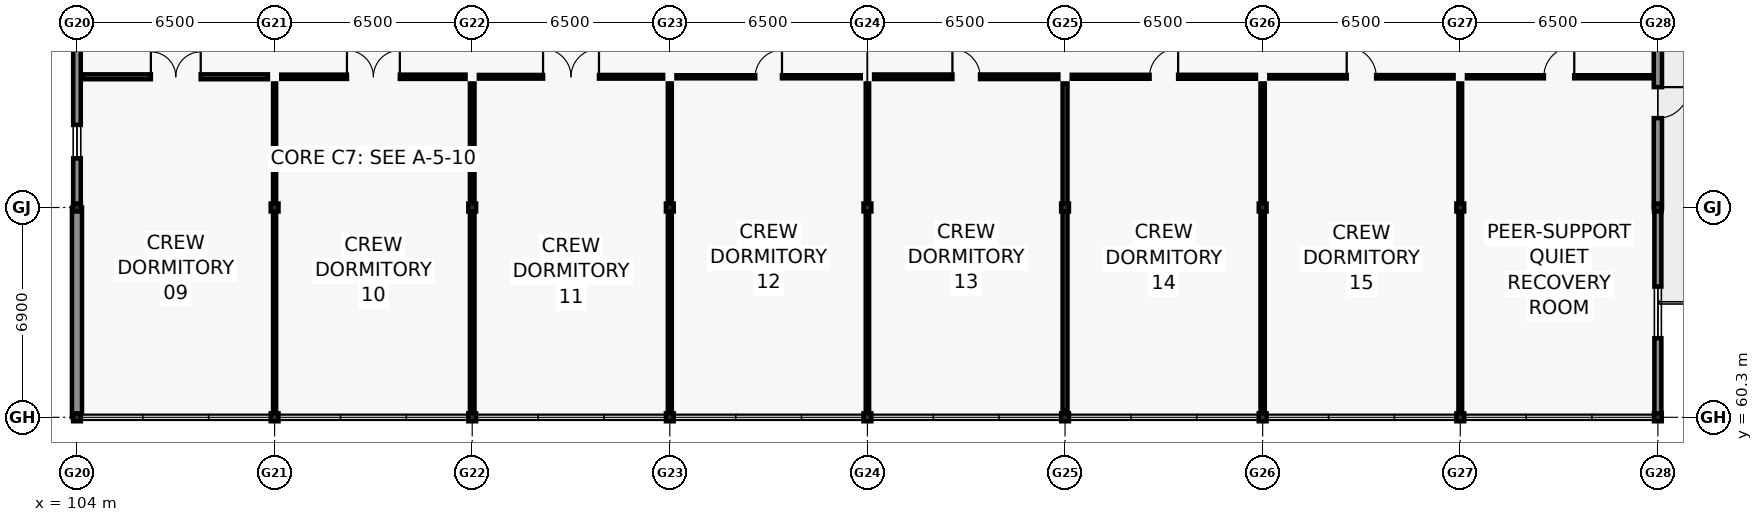
"""IFC4 building model, lengths in metres.
Left out: names, types, materials, properties, quantities, classifications, styles, units other than length and angle.
Written with IfcOpenShell. Run it as: python <this file> out.ifc"""

import sys

from ifc_helpers import new_model, si_unit, direction, frame, frame_2d, origin, origin_2d, place, context, subcontext, project, spatial, rectangle, i_section, extrude, element, fill, save


model = new_model("IFC4")
c1 = context("Model", 3, precision=1e-05, world=origin(), true_north=direction((0.0, 1.0)))
c2 = subcontext(c1, "Body", "Model", "MODEL_VIEW")
j1 = project(units=[si_unit("LENGTHUNIT", "METRE"), si_unit("PLANEANGLEUNIT", "RADIAN")], contexts=[c1])
p1 = place(None, origin())
s1 = spatial("IfcSite", under=j1, at=p1, CompositionType="ELEMENT")
p2 = place(p1, origin())
s2 = spatial("IfcBuilding", under=s1, at=p2, CompositionType="ELEMENT")
p3 = place(p2, frame((0.0, 0.0, 13.5)))
s3 = spatial("IfcBuildingStorey", under=s2, at=p3, CompositionType="ELEMENT", Elevation=13.5)
for number, where, z_axis, x_axis in (
    (1, (104.0, 60.3, 0.0), (0.0, 0.0, 1.0), (1.0, 0.0, 0.0)),
    (2, (104.0, 67.2, 0.0), (0.0, 0.0, 1.0), (1.0, 0.0, 0.0)),
    (3, (110.5, 60.3, 0.0), (0.0, 0.0, 1.0), (1.0, 0.0, 0.0)),
    (4, (110.5, 67.2, 0.0), (0.0, 0.0, 1.0), (1.0, 0.0, 0.0)),
    (5, (117.0, 60.3, 0.0), (0.0, 0.0, 1.0), (1.0, 0.0, 0.0)),
    (6, (117.0, 67.2, 0.0), (0.0, 0.0, 1.0), (1.0, 0.0, 0.0)),
    (7, (123.5, 60.3, 0.0), (0.0, 0.0, 1.0), (1.0, 0.0, 0.0)),
    (8, (123.5, 67.2, 0.0), (0.0, 0.0, 1.0), (1.0, 0.0, 0.0)),
    (9, (130.0, 60.3, 0.0), (0.0, 0.0, 1.0), (1.0, 0.0, 0.0)),
    (10, (130.0, 67.2, 0.0), (0.0, 0.0, 1.0), (1.0, 0.0, 0.0)),
    (11, (136.5, 60.3, 0.0), (0.0, 0.0, 1.0), (1.0, 0.0, 0.0)),
    (12, (136.5, 67.2, 0.0), (0.0, 0.0, 1.0), (1.0, 0.0, 0.0)),
    (13, (143.0, 60.3, 0.0), (0.0, 0.0, 1.0), (1.0, 0.0, 0.0)),
    (14, (143.0, 67.2, 0.0), (0.0, 0.0, 1.0), (1.0, 0.0, 0.0)),
    (15, (149.5, 60.3, 0.0), (0.0, 0.0, 1.0), (1.0, 0.0, 0.0)),
    (16, (149.5, 67.2, 0.0), (0.0, 0.0, 1.0), (1.0, 0.0, 0.0)),
    (17, (156.0, 60.3, 0.0), (0.0, 0.0, 1.0), (1.0, 0.0, 0.0)),
    (18, (156.0, 67.2, 0.0), (0.0, 0.0, 1.0), (1.0, 0.0, 0.0)),
):
    element("IfcColumn", number, at=place(p3, frame(where, z_axis=z_axis, x_axis=x_axis)), inside=s3, PredefinedType="COLUMN", context=c2, shape_type="SweptSolid", body=[
        extrude(i_section(OverallWidth=0.256, OverallDepth=0.26, WebThickness=0.01, FlangeThickness=0.017, FilletRadius=0.013, at=origin_2d()), origin(), (0.0, 0.0, 1.0), 3.9),
    ])
p4 = place(p3, frame((104.0, 60.305, 0.0), z_axis=(0.0, 0.0, 1.0), x_axis=(0.0, 1.0, 0.0)))
e19 = element("IfcWall", 19, at=p4, inside=s3, PredefinedType="SOLIDWALL", context=c2, shape_type="SweptSolid", body=[
    extrude(rectangle(XDim=6.89, YDim=0.33, at=frame_2d((3.445, 0.0))), origin(), (0.0, 0.0, 1.0), 3.02),
])
p5 = place(p3, frame((156.0, 67.195, 0.0), z_axis=(0.0, 0.0, 1.0), x_axis=(0.0, -1.0, 0.0)))
e20 = element("IfcWall", 20, at=p5, inside=s3, PredefinedType="SOLIDWALL", context=c2, shape_type="SweptSolid", body=[
    extrude(rectangle(XDim=6.89, YDim=0.23, at=frame_2d((3.445, 0.0))), origin(), (0.0, 0.0, 1.0), 3.02),
])
p6 = place(p5, frame((2.595, 0.0, 0.8)))
e21 = element("IfcOpeningElement", 21, at=p6, cuts=e20, PredefinedType="OPENING", context=c2, shape_type="SweptSolid", body=[
    extrude(rectangle(XDim=1.7, YDim=1.25, at=frame_2d((0.85, 0.625))), frame((0.0, 0.125, 0.0), z_axis=(0.0, -1.0, 0.0), x_axis=(1.0, 0.0, 0.0)), (0.0, 0.0, 1.0), 0.25),
])
p7 = place(p3, frame((104.0, 67.205, 0.0), z_axis=(0.0, 0.0, 1.0), x_axis=(0.0, 1.0, 0.0)))
e22 = element("IfcWall", 22, at=p7, inside=s3, PredefinedType="SOLIDWALL", context=c2, shape_type="SweptSolid", body=[
    extrude(rectangle(XDim=6.89, YDim=0.25, at=frame_2d((3.445, 0.0))), origin(), (0.0, 0.0, 1.0), 3.02),
])
p8 = place(p7, frame((1.613, 0.0, 0.8)))
e23 = element("IfcOpeningElement", 23, at=p8, cuts=e22, PredefinedType="OPENING", context=c2, shape_type="SweptSolid", body=[
    extrude(rectangle(XDim=1.1, YDim=1.5, at=frame_2d((0.55, 0.75))), frame((0.0, 0.135, 0.0), z_axis=(0.0, -1.0, 0.0), x_axis=(1.0, 0.0, 0.0)), (0.0, 0.0, 1.0), 0.27),
])
p9 = place(p3, frame((156.0, 74.095, 0.0), z_axis=(0.0, 0.0, 1.0), x_axis=(0.0, -1.0, 0.0)))
e24 = element("IfcWall", 24, at=p9, inside=s3, PredefinedType="SOLIDWALL", context=c2, shape_type="SweptSolid", body=[
    extrude(rectangle(XDim=6.89, YDim=0.27, at=frame_2d((3.445, 0.0))), origin(), (0.0, 0.0, 1.0), 3.02),
])
p10 = place(p9, frame((2.935, 0.0, 0.0)))
e25 = element("IfcOpeningElement", 25, at=p10, cuts=e24, PredefinedType="OPENING", context=c2, shape_type="SweptSolid", body=[
    extrude(rectangle(XDim=1.02, YDim=2.14, at=frame_2d((0.51, 1.07))), frame((0.0, 0.145, 0.0), z_axis=(0.0, -1.0, 0.0), x_axis=(1.0, 0.0, 0.0)), (0.0, 0.0, 1.0), 0.29),
])
p11 = place(p3, frame((110.5, 60.52, 0.0), z_axis=(0.0, 0.0, 1.0), x_axis=(0.0, 1.0, 0.0)))
e26 = element("IfcWall", 26, at=p11, inside=s3, PredefinedType="PARTITIONING", context=c2, shape_type="SweptSolid", body=[
    extrude(rectangle(XDim=10.76, YDim=0.1, at=frame_2d((5.38, 0.0))), origin(), (0.0, 0.0, 1.0), 3.0),
])
p12 = place(p3, frame((104.22, 71.5, 0.0), z_axis=(0.0, 0.0, 1.0), x_axis=(1.0, 0.0, 0.0)))
e27 = element("IfcWall", 27, at=p12, inside=s3, PredefinedType="PARTITIONING", context=c2, shape_type="SweptSolid", body=[
    extrude(rectangle(XDim=6.06, YDim=0.16, at=frame_2d((3.03, 0.0))), origin(), (0.0, 0.0, 1.0), 3.0),
])
p13 = place(p12, frame((2.21, 0.0, 0.0)))
e28 = element("IfcOpeningElement", 28, at=p13, cuts=e27, PredefinedType="OPENING", context=c2, shape_type="SweptSolid", body=[
    extrude(rectangle(XDim=1.64, YDim=2.2, at=frame_2d((0.82, 1.1))), frame((0.0, 0.09, 0.0), z_axis=(0.0, -1.0, 0.0), x_axis=(1.0, 0.0, 0.0)), (0.0, 0.0, 1.0), 0.18),
])
p14 = place(p3, frame((117.0, 60.52, 0.0), z_axis=(0.0, 0.0, 1.0), x_axis=(0.0, 1.0, 0.0)))
e29 = element("IfcWall", 29, at=p14, inside=s3, PredefinedType="PARTITIONING", context=c2, shape_type="SweptSolid", body=[
    extrude(rectangle(XDim=10.76, YDim=0.15, at=frame_2d((5.38, 0.0))), origin(), (0.0, 0.0, 1.0), 3.0),
])
p15 = place(p3, frame((110.72, 71.5, 0.0), z_axis=(0.0, 0.0, 1.0), x_axis=(1.0, 0.0, 0.0)))
e30 = element("IfcWall", 30, at=p15, inside=s3, PredefinedType="PARTITIONING", context=c2, shape_type="SweptSolid", body=[
    extrude(rectangle(XDim=6.06, YDim=0.14, at=frame_2d((3.03, 0.0))), origin(), (0.0, 0.0, 1.0), 3.0),
])
p16 = place(p15, frame((2.16, 0.0, 0.0)))
e31 = element("IfcOpeningElement", 31, at=p16, cuts=e30, PredefinedType="OPENING", context=c2, shape_type="SweptSolid", body=[
    extrude(rectangle(XDim=1.74, YDim=2.2, at=frame_2d((0.87, 1.1))), frame((0.0, 0.08, 0.0), z_axis=(0.0, -1.0, 0.0), x_axis=(1.0, 0.0, 0.0)), (0.0, 0.0, 1.0), 0.16),
])
p17 = place(p3, frame((123.5, 60.52, 0.0), z_axis=(0.0, 0.0, 1.0), x_axis=(0.0, 1.0, 0.0)))
e32 = element("IfcWall", 32, at=p17, inside=s3, PredefinedType="PARTITIONING", context=c2, shape_type="SweptSolid", body=[
    extrude(rectangle(XDim=10.76, YDim=0.13, at=frame_2d((5.38, 0.0))), origin(), (0.0, 0.0, 1.0), 3.0),
])
p18 = place(p3, frame((117.22, 71.5, 0.0), z_axis=(0.0, 0.0, 1.0), x_axis=(1.0, 0.0, 0.0)))
e33 = element("IfcWall", 33, at=p18, inside=s3, PredefinedType="PARTITIONING", context=c2, shape_type="SweptSolid", body=[
    extrude(rectangle(XDim=6.06, YDim=0.12, at=frame_2d((3.03, 0.0))), origin(), (0.0, 0.0, 1.0), 3.0),
])
p19 = place(p18, frame((2.11, 0.0, 0.0)))
e34 = element("IfcOpeningElement", 34, at=p19, cuts=e33, PredefinedType="OPENING", context=c2, shape_type="SweptSolid", body=[
    extrude(rectangle(XDim=1.84, YDim=2.22, at=frame_2d((0.92, 1.11))), frame((0.0, 0.07, 0.0), z_axis=(0.0, -1.0, 0.0), x_axis=(1.0, 0.0, 0.0)), (0.0, 0.0, 1.0), 0.14),
])
p20 = place(p3, frame((130.0, 60.52, 0.0), z_axis=(0.0, 0.0, 1.0), x_axis=(0.0, 1.0, 0.0)))
e35 = element("IfcWall", 35, at=p20, inside=s3, PredefinedType="PARTITIONING", context=c2, shape_type="SweptSolid", body=[
    extrude(rectangle(XDim=10.76, YDim=0.11, at=frame_2d((5.38, 0.0))), origin(), (0.0, 0.0, 1.0), 3.0),
])
p21 = place(p3, frame((123.72, 71.5, 0.0), z_axis=(0.0, 0.0, 1.0), x_axis=(1.0, 0.0, 0.0)))
e36 = element("IfcWall", 36, at=p21, inside=s3, PredefinedType="PARTITIONING", context=c2, shape_type="SweptSolid", body=[
    extrude(rectangle(XDim=6.06, YDim=0.1, at=frame_2d((3.03, 0.0))), origin(), (0.0, 0.0, 1.0), 3.0),
])
p22 = place(p21, frame((2.59, 0.0, 0.0)))
e37 = element("IfcOpeningElement", 37, at=p22, cuts=e36, PredefinedType="OPENING", context=c2, shape_type="SweptSolid", body=[
    extrude(rectangle(XDim=0.88, YDim=2.04, at=frame_2d((0.44, 1.02))), frame((0.0, 0.06, 0.0), z_axis=(0.0, -1.0, 0.0), x_axis=(1.0, 0.0, 0.0)), (0.0, 0.0, 1.0), 0.12),
])
p23 = place(p3, frame((136.5, 60.52, 0.0), z_axis=(0.0, 0.0, 1.0), x_axis=(0.0, 1.0, 0.0)))
e38 = element("IfcWall", 38, at=p23, inside=s3, PredefinedType="PARTITIONING", context=c2, shape_type="SweptSolid", body=[
    extrude(rectangle(XDim=10.76, YDim=0.16, at=frame_2d((5.38, 0.0))), origin(), (0.0, 0.0, 1.0), 3.0),
])
p24 = place(p3, frame((130.22, 71.5, 0.0), z_axis=(0.0, 0.0, 1.0), x_axis=(1.0, 0.0, 0.0)))
e39 = element("IfcWall", 39, at=p24, inside=s3, PredefinedType="PARTITIONING", context=c2, shape_type="SweptSolid", body=[
    extrude(rectangle(XDim=6.06, YDim=0.15, at=frame_2d((3.03, 0.0))), origin(), (0.0, 0.0, 1.0), 3.0),
])
p25 = place(p24, frame((2.575, 0.0, 0.0)))
e40 = element("IfcOpeningElement", 40, at=p25, cuts=e39, PredefinedType="OPENING", context=c2, shape_type="SweptSolid", body=[
    extrude(rectangle(XDim=0.91, YDim=2.06, at=frame_2d((0.455, 1.03))), frame((0.0, 0.085, 0.0), z_axis=(0.0, -1.0, 0.0), x_axis=(1.0, 0.0, 0.0)), (0.0, 0.0, 1.0), 0.17),
])
p26 = place(p3, frame((143.0, 60.52, 0.0), z_axis=(0.0, 0.0, 1.0), x_axis=(0.0, 1.0, 0.0)))
e41 = element("IfcWall", 41, at=p26, inside=s3, PredefinedType="PARTITIONING", context=c2, shape_type="SweptSolid", body=[
    extrude(rectangle(XDim=10.76, YDim=0.14, at=frame_2d((5.38, 0.0))), origin(), (0.0, 0.0, 1.0), 3.0),
])
p27 = place(p3, frame((136.72, 71.5, 0.0), z_axis=(0.0, 0.0, 1.0), x_axis=(1.0, 0.0, 0.0)))
e42 = element("IfcWall", 42, at=p27, inside=s3, PredefinedType="PARTITIONING", context=c2, shape_type="SweptSolid", body=[
    extrude(rectangle(XDim=6.06, YDim=0.13, at=frame_2d((3.03, 0.0))), origin(), (0.0, 0.0, 1.0), 3.0),
])
p28 = place(p27, frame((2.56, 0.0, 0.0)))
e43 = element("IfcOpeningElement", 43, at=p28, cuts=e42, PredefinedType="OPENING", context=c2, shape_type="SweptSolid", body=[
    extrude(rectangle(XDim=0.94, YDim=2.08, at=frame_2d((0.47, 1.04))), frame((0.0, 0.075, 0.0), z_axis=(0.0, -1.0, 0.0), x_axis=(1.0, 0.0, 0.0)), (0.0, 0.0, 1.0), 0.15),
])
p29 = place(p3, frame((149.5, 60.52, 0.0), z_axis=(0.0, 0.0, 1.0), x_axis=(0.0, 1.0, 0.0)))
e44 = element("IfcWall", 44, at=p29, inside=s3, PredefinedType="PARTITIONING", context=c2, shape_type="SweptSolid", body=[
    extrude(rectangle(XDim=10.76, YDim=0.12, at=frame_2d((5.38, 0.0))), origin(), (0.0, 0.0, 1.0), 3.0),
])
p30 = place(p3, frame((143.22, 71.5, 0.0), z_axis=(0.0, 0.0, 1.0), x_axis=(1.0, 0.0, 0.0)))
e45 = element("IfcWall", 45, at=p30, inside=s3, PredefinedType="PARTITIONING", context=c2, shape_type="SweptSolid", body=[
    extrude(rectangle(XDim=6.06, YDim=0.11, at=frame_2d((3.03, 0.0))), origin(), (0.0, 0.0, 1.0), 3.0),
])
p31 = place(p30, frame((2.545, 0.0, 0.0)))
e46 = element("IfcOpeningElement", 46, at=p31, cuts=e45, PredefinedType="OPENING", context=c2, shape_type="SweptSolid", body=[
    extrude(rectangle(XDim=0.97, YDim=2.1, at=frame_2d((0.485, 1.05))), frame((0.0, 0.065, 0.0), z_axis=(0.0, -1.0, 0.0), x_axis=(1.0, 0.0, 0.0)), (0.0, 0.0, 1.0), 0.13),
])
p32 = place(p3, frame((149.72, 71.5, 0.0), z_axis=(0.0, 0.0, 1.0), x_axis=(1.0, 0.0, 0.0)))
e47 = element("IfcWall", 47, at=p32, inside=s3, PredefinedType="PARTITIONING", context=c2, shape_type="SweptSolid", body=[
    extrude(rectangle(XDim=6.06, YDim=0.1, at=frame_2d((3.03, 0.0))), origin(), (0.0, 0.0, 1.0), 3.0),
])
p33 = place(p32, frame((2.53, 0.0, 0.0)))
e48 = element("IfcOpeningElement", 48, at=p33, cuts=e47, PredefinedType="OPENING", context=c2, shape_type="SweptSolid", body=[
    extrude(rectangle(XDim=1.0, YDim=2.12, at=frame_2d((0.5, 1.06))), frame((0.0, 0.06, 0.0), z_axis=(0.0, -1.0, 0.0), x_axis=(1.0, 0.0, 0.0)), (0.0, 0.0, 1.0), 0.12),
])
p34 = place(p6, origin())
e49 = element("IfcWindow", 49, at=p34, inside=s3, PartitioningType="DOUBLE_PANEL_VERTICAL", PredefinedType="WINDOW", context=c2, shape_type="SweptSolid", body=[
    extrude(rectangle(XDim=1.7, YDim=1.25, at=frame_2d((0.85, 0.625))), frame((0.0, 0.03, 0.0), z_axis=(0.0, -1.0, 0.0), x_axis=(1.0, 0.0, 0.0)), (0.0, 0.0, 1.0), 0.06),
])
fill(e21, e49)
p35 = place(p8, origin())
e50 = element("IfcWindow", 50, at=p35, inside=s3, PartitioningType="SINGLE_PANEL", PredefinedType="WINDOW", context=c2, shape_type="SweptSolid", body=[
    extrude(rectangle(XDim=1.1, YDim=1.5, at=frame_2d((0.55, 0.75))), frame((0.0, 0.03, 0.0), z_axis=(0.0, -1.0, 0.0), x_axis=(1.0, 0.0, 0.0)), (0.0, 0.0, 1.0), 0.06),
])
fill(e23, e50)
p36 = place(p10, origin())
e51 = element("IfcDoor", 51, at=p36, inside=s3, OperationType="SINGLE_SWING_LEFT", PredefinedType="DOOR", context=c2, shape_type="SweptSolid", body=[
    extrude(rectangle(XDim=1.02, YDim=2.14, at=frame_2d((0.51, 1.07))), frame((0.0, 0.025, 0.0), z_axis=(0.0, -1.0, 0.0), x_axis=(1.0, 0.0, 0.0)), (0.0, 0.0, 1.0), 0.05),
])
fill(e25, e51)
p37 = place(p13, origin())
e52 = element("IfcDoor", 52, at=p37, inside=s3, OperationType="DOUBLE_DOOR_SINGLE_SWING", PredefinedType="DOOR", context=c2, shape_type="SweptSolid", body=[
    extrude(rectangle(XDim=1.64, YDim=2.2, at=frame_2d((0.82, 1.1))), frame((0.0, 0.025, 0.0), z_axis=(0.0, -1.0, 0.0), x_axis=(1.0, 0.0, 0.0)), (0.0, 0.0, 1.0), 0.05),
])
fill(e28, e52)
p38 = place(p16, origin())
e53 = element("IfcDoor", 53, at=p38, inside=s3, OperationType="DOUBLE_DOOR_SINGLE_SWING", PredefinedType="DOOR", context=c2, shape_type="SweptSolid", body=[
    extrude(rectangle(XDim=1.74, YDim=2.2, at=frame_2d((0.87, 1.1))), frame((0.0, 0.025, 0.0), z_axis=(0.0, -1.0, 0.0), x_axis=(1.0, 0.0, 0.0)), (0.0, 0.0, 1.0), 0.05),
])
fill(e31, e53)
p39 = place(p19, origin())
e54 = element("IfcDoor", 54, at=p39, inside=s3, OperationType="DOUBLE_DOOR_SINGLE_SWING", PredefinedType="DOOR", context=c2, shape_type="SweptSolid", body=[
    extrude(rectangle(XDim=1.84, YDim=2.22, at=frame_2d((0.92, 1.11))), frame((0.0, 0.025, 0.0), z_axis=(0.0, -1.0, 0.0), x_axis=(1.0, 0.0, 0.0)), (0.0, 0.0, 1.0), 0.05),
])
fill(e34, e54)
p40 = place(p22, origin())
e55 = element("IfcDoor", 55, at=p40, inside=s3, OperationType="SINGLE_SWING_RIGHT", PredefinedType="DOOR", context=c2, shape_type="SweptSolid", body=[
    extrude(rectangle(XDim=0.88, YDim=2.04, at=frame_2d((0.44, 1.02))), frame((0.0, 0.025, 0.0), z_axis=(0.0, -1.0, 0.0), x_axis=(1.0, 0.0, 0.0)), (0.0, 0.0, 1.0), 0.05),
])
fill(e37, e55)
p41 = place(p25, origin())
e56 = element("IfcDoor", 56, at=p41, inside=s3, OperationType="SINGLE_SWING_LEFT", PredefinedType="DOOR", context=c2, shape_type="SweptSolid", body=[
    extrude(rectangle(XDim=0.91, YDim=2.06, at=frame_2d((0.455, 1.03))), frame((0.0, 0.025, 0.0), z_axis=(0.0, -1.0, 0.0), x_axis=(1.0, 0.0, 0.0)), (0.0, 0.0, 1.0), 0.05),
])
fill(e40, e56)
p42 = place(p28, origin())
e57 = element("IfcDoor", 57, at=p42, inside=s3, OperationType="SINGLE_SWING_RIGHT", PredefinedType="DOOR", context=c2, shape_type="SweptSolid", body=[
    extrude(rectangle(XDim=0.94, YDim=2.08, at=frame_2d((0.47, 1.04))), frame((0.0, 0.025, 0.0), z_axis=(0.0, -1.0, 0.0), x_axis=(1.0, 0.0, 0.0)), (0.0, 0.0, 1.0), 0.05),
])
fill(e43, e57)
p43 = place(p31, origin())
e58 = element("IfcDoor", 58, at=p43, inside=s3, OperationType="SINGLE_SWING_LEFT", PredefinedType="DOOR", context=c2, shape_type="SweptSolid", body=[
    extrude(rectangle(XDim=0.97, YDim=2.1, at=frame_2d((0.485, 1.05))), frame((0.0, 0.025, 0.0), z_axis=(0.0, -1.0, 0.0), x_axis=(1.0, 0.0, 0.0)), (0.0, 0.0, 1.0), 0.05),
])
fill(e46, e58)
p44 = place(p33, origin())
e59 = element("IfcDoor", 59, at=p44, inside=s3, OperationType="SINGLE_SWING_RIGHT", PredefinedType="DOOR", context=c2, shape_type="SweptSolid", body=[
    extrude(rectangle(XDim=1.0, YDim=2.12, at=frame_2d((0.5, 1.06))), frame((0.0, 0.025, 0.0), z_axis=(0.0, -1.0, 0.0), x_axis=(1.0, 0.0, 0.0)), (0.0, 0.0, 1.0), 0.05),
])
fill(e48, e59)
save(model, sys.argv[1])
